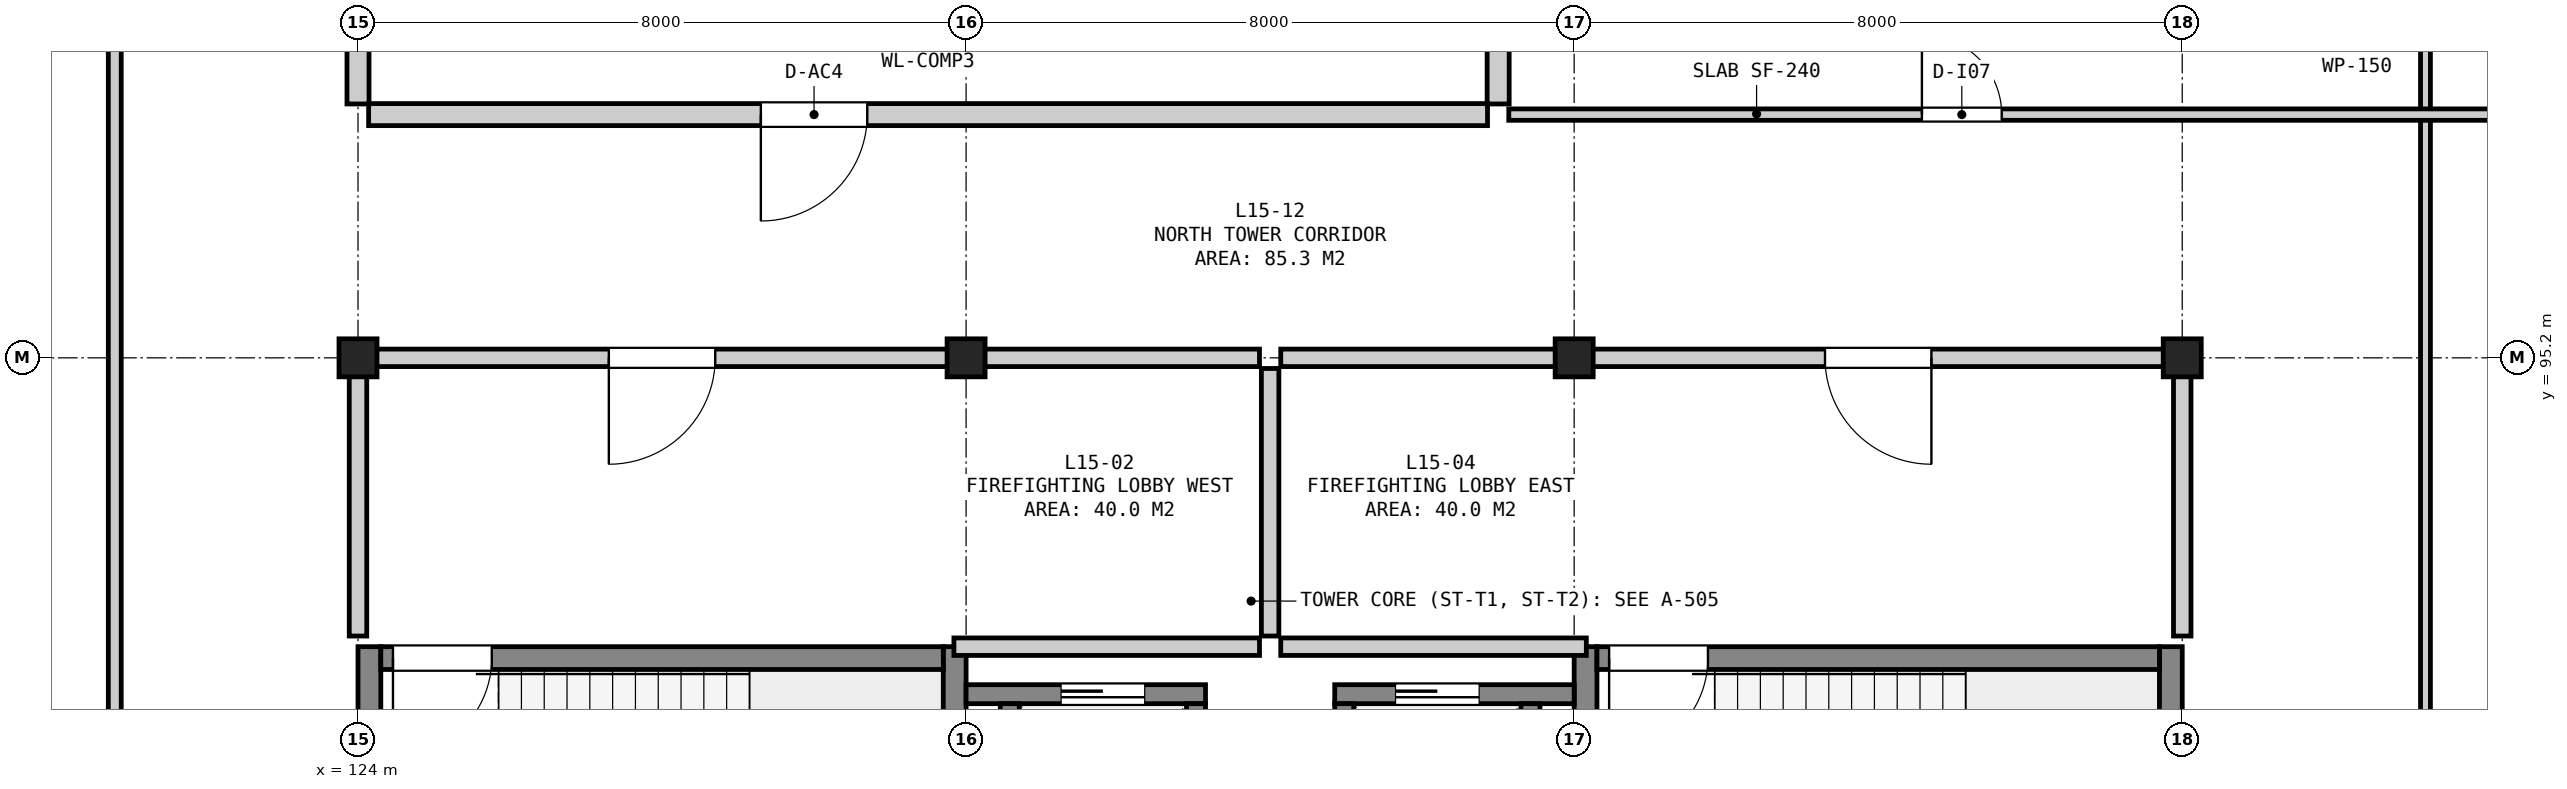
"""IFC4 building model, lengths in metres.
Left out: names, types, materials, properties, quantities, classifications, styles, units other than length and angle.
Written with IfcOpenShell. Run it as: python <this file> out.ifc"""

import sys

from ifc_helpers import new_model, si_unit, direction, frame, frame_2d, origin, origin_2d, place, context, subcontext, project, spatial, rectangle, extrude, element, fill, save


model = new_model("IFC4")
c1 = context("Model", 3, precision=1e-05, world=origin(), true_north=direction((0.0, 1.0)))
c2 = subcontext(c1, "Body", "Model", "MODEL_VIEW")
j1 = project(units=[si_unit("LENGTHUNIT", "METRE"), si_unit("PLANEANGLEUNIT", "RADIAN")], contexts=[c1])
p1 = place(None, origin())
s1 = spatial("IfcSite", under=j1, at=p1, CompositionType="ELEMENT")
p2 = place(p1, origin())
s2 = spatial("IfcBuilding", under=s1, at=p2, CompositionType="ELEMENT")
p3 = place(p2, frame((0.0, 0.0, 62.65)))
s3 = spatial("IfcBuildingStorey", under=s2, at=p3, CompositionType="ELEMENT", Elevation=62.65)
for number, where, z_axis, x_axis in (
    (1, (124.0, 95.2, 0.0), (0.0, 0.0, 1.0), (1.0, 0.0, 0.0)),
    (2, (132.0, 95.2, 0.0), (0.0, 0.0, 1.0), (1.0, 0.0, 0.0)),
    (3, (140.0, 95.2, 0.0), (0.0, 0.0, 1.0), (1.0, 0.0, 0.0)),
    (4, (148.0, 95.2, 0.0), (0.0, 0.0, 1.0), (1.0, 0.0, 0.0)),
):
    element("IfcColumn", number, at=place(p3, frame(where, z_axis=z_axis, x_axis=x_axis)), inside=s3, PredefinedType="COLUMN", context=c2, shape_type="SweptSolid", body=[
        extrude(rectangle(XDim=0.5, YDim=0.5, at=origin_2d()), origin(), (0.0, 0.0, 1.0), 3.95),
    ])
for number, where, z_axis, x_axis in (
    (5, (124.15, 87.2, 0.0), (0.0, 0.0, 1.0), (0.0, 1.0, 0.0)),
    (6, (131.85, 87.2, 0.0), (0.0, 0.0, 1.0), (0.0, 1.0, 0.0)),
):
    element("IfcWall", number, at=place(p3, frame(where, z_axis=z_axis, x_axis=x_axis)), inside=s3, PredefinedType="SHEAR", context=c2, shape_type="SweptSolid", body=[
        extrude(rectangle(XDim=4.2, YDim=0.3, at=frame_2d((2.1, 0.0))), origin(), (0.0, 0.0, 1.0), 3.67),
    ])
p4 = place(p3, frame((124.3, 91.25, 0.0), z_axis=(0.0, 0.0, 1.0), x_axis=(1.0, 0.0, 0.0)))
e7 = element("IfcWall", 7, at=p4, inside=s3, PredefinedType="SHEAR", context=c2, shape_type="SweptSolid", body=[
    extrude(rectangle(XDim=7.4, YDim=0.3, at=frame_2d((3.7, 0.0))), origin(), (0.0, 0.0, 1.0), 3.67),
])
p5 = place(p4, frame((0.16, 0.0, 0.0)))
e8 = element("IfcOpeningElement", 8, at=p5, cuts=e7, PredefinedType="OPENING", context=c2, shape_type="SweptSolid", body=[
    extrude(rectangle(XDim=1.3, YDim=2.18, at=frame_2d((0.65, 1.09))), frame((0.0, 0.162, 0.0), z_axis=(0.0, -1.0, 0.0), x_axis=(1.0, 0.0, 0.0)), (0.0, 0.0, 1.0), 0.324),
])
for number, where, z_axis, x_axis in (
    (9, (140.15, 87.2, 0.0), (0.0, 0.0, 1.0), (0.0, 1.0, 0.0)),
    (10, (147.85, 87.2, 0.0), (0.0, 0.0, 1.0), (0.0, 1.0, 0.0)),
):
    element("IfcWall", number, at=place(p3, frame(where, z_axis=z_axis, x_axis=x_axis)), inside=s3, PredefinedType="SHEAR", context=c2, shape_type="SweptSolid", body=[
        extrude(rectangle(XDim=4.2, YDim=0.3, at=frame_2d((2.1, 0.0))), origin(), (0.0, 0.0, 1.0), 3.67),
    ])
p6 = place(p3, frame((140.3, 91.25, 0.0), z_axis=(0.0, 0.0, 1.0), x_axis=(1.0, 0.0, 0.0)))
e11 = element("IfcWall", 11, at=p6, inside=s3, PredefinedType="SHEAR", context=c2, shape_type="SweptSolid", body=[
    extrude(rectangle(XDim=7.4, YDim=0.3, at=frame_2d((3.7, 0.0))), origin(), (0.0, 0.0, 1.0), 3.67),
])
p7 = place(p6, frame((0.16, 0.0, 0.0)))
e12 = element("IfcOpeningElement", 12, at=p7, cuts=e11, PredefinedType="OPENING", context=c2, shape_type="SweptSolid", body=[
    extrude(rectangle(XDim=1.3, YDim=2.18, at=frame_2d((0.65, 1.09))), frame((0.0, 0.162, 0.0), z_axis=(0.0, -1.0, 0.0), x_axis=(1.0, 0.0, 0.0)), (0.0, 0.0, 1.0), 0.324),
])
p8 = place(p3, frame((132.0, 90.775, 0.0), z_axis=(0.0, 0.0, 1.0), x_axis=(1.0, 0.0, 0.0)))
e13 = element("IfcWall", 13, at=p8, inside=s3, PredefinedType="SHEAR", context=c2, shape_type="SweptSolid", body=[
    extrude(rectangle(XDim=3.15, YDim=0.25, at=frame_2d((1.575, 0.0))), origin(), (0.0, 0.0, 1.0), 3.67),
])
p9 = place(p8, frame((1.25, 0.0, 0.0)))
e14 = element("IfcOpeningElement", 14, at=p9, cuts=e13, PredefinedType="OPENING", context=c2, shape_type="SweptSolid", body=[
    extrude(rectangle(XDim=1.1, YDim=2.15, at=frame_2d((0.55, 1.075))), frame((0.0, 0.137, 0.0), z_axis=(0.0, -1.0, 0.0), x_axis=(1.0, 0.0, 0.0)), (0.0, 0.0, 1.0), 0.274),
])
for number, where, z_axis, x_axis in (
    (15, (132.575, 87.75, 0.0), (0.0, 0.0, 1.0), (0.0, 1.0, 0.0)),
    (16, (135.025, 87.75, 0.0), (0.0, 0.0, 1.0), (0.0, 1.0, 0.0)),
):
    element("IfcWall", number, at=place(p3, frame(where, z_axis=z_axis, x_axis=x_axis)), inside=s3, PredefinedType="SHEAR", context=c2, shape_type="SweptSolid", body=[
        extrude(rectangle(XDim=2.9, YDim=0.25, at=frame_2d((1.45, 0.0))), origin(), (0.0, 0.0, 1.0), 3.67),
    ])
p10 = place(p3, frame((136.85, 90.775, 0.0), z_axis=(0.0, 0.0, 1.0), x_axis=(1.0, 0.0, 0.0)))
e17 = element("IfcWall", 17, at=p10, inside=s3, PredefinedType="SHEAR", context=c2, shape_type="SweptSolid", body=[
    extrude(rectangle(XDim=3.15, YDim=0.25, at=frame_2d((1.575, 0.0))), origin(), (0.0, 0.0, 1.0), 3.67),
])
p11 = place(p10, frame((0.8, 0.0, 0.0)))
e18 = element("IfcOpeningElement", 18, at=p11, cuts=e17, PredefinedType="OPENING", context=c2, shape_type="SweptSolid", body=[
    extrude(rectangle(XDim=1.1, YDim=2.15, at=frame_2d((0.55, 1.075))), frame((0.0, 0.137, 0.0), z_axis=(0.0, -1.0, 0.0), x_axis=(1.0, 0.0, 0.0)), (0.0, 0.0, 1.0), 0.274),
])
for number, where, z_axis, x_axis in (
    (19, (136.975, 87.75, 0.0), (0.0, 0.0, 1.0), (0.0, 1.0, 0.0)),
    (20, (139.425, 87.75, 0.0), (0.0, 0.0, 1.0), (0.0, 1.0, 0.0)),
):
    element("IfcWall", number, at=place(p3, frame(where, z_axis=z_axis, x_axis=x_axis)), inside=s3, PredefinedType="SHEAR", context=c2, shape_type="SweptSolid", body=[
        extrude(rectangle(XDim=2.9, YDim=0.25, at=frame_2d((1.45, 0.0))), origin(), (0.0, 0.0, 1.0), 3.67),
    ])
p12 = place(p3, frame((131.84, 91.4, 0.0), z_axis=(0.0, 0.0, 1.0), x_axis=(1.0, 0.0, 0.0)))
e21 = element("IfcWall", 21, at=p12, inside=s3, PredefinedType="SOLIDWALL", context=c2, shape_type="SweptSolid", body=[
    extrude(rectangle(XDim=4.02, YDim=0.23, at=frame_2d((2.01, 0.0))), origin(), (0.0, 0.0, 1.0), 3.67),
])
p13 = place(p3, frame((124.14, 95.2, 0.0), z_axis=(0.0, 0.0, 1.0), x_axis=(1.0, 0.0, 0.0)))
e22 = element("IfcWall", 22, at=p13, inside=s3, PredefinedType="SOLIDWALL", context=c2, shape_type="SweptSolid", body=[
    extrude(rectangle(XDim=11.72, YDim=0.23, at=frame_2d((5.86, 0.0))), origin(), (0.0, 0.0, 1.0), 3.045),
])
p14 = place(p13, frame((3.16, 0.0, 0.0)))
e23 = element("IfcOpeningElement", 23, at=p14, cuts=e22, PredefinedType="OPENING", context=c2, shape_type="SweptSolid", body=[
    extrude(rectangle(XDim=1.4, YDim=2.2, at=frame_2d((0.7, 1.1))), frame((0.0, 0.127, 0.0), z_axis=(0.0, -1.0, 0.0), x_axis=(1.0, 0.0, 0.0)), (0.0, 0.0, 1.0), 0.254),
])
p15 = place(p3, frame((124.0, 91.54, 0.0), z_axis=(0.0, 0.0, 1.0), x_axis=(0.0, 1.0, 0.0)))
e24 = element("IfcWall", 24, at=p15, inside=s3, PredefinedType="SOLIDWALL", context=c2, shape_type="SweptSolid", body=[
    extrude(rectangle(XDim=3.52, YDim=0.23, at=frame_2d((1.76, 0.0))), origin(), (0.0, 0.0, 1.0), 2.795),
])
p16 = place(p3, frame((136.0, 91.54, 0.0), z_axis=(0.0, 0.0, 1.0), x_axis=(0.0, 1.0, 0.0)))
e25 = element("IfcWall", 25, at=p16, inside=s3, PredefinedType="SOLIDWALL", context=c2, shape_type="SweptSolid", body=[
    extrude(rectangle(XDim=3.52, YDim=0.23, at=frame_2d((1.76, 0.0))), origin(), (0.0, 0.0, 1.0), 3.67),
])
p17 = place(p3, frame((136.14, 91.4, 0.0), z_axis=(0.0, 0.0, 1.0), x_axis=(1.0, 0.0, 0.0)))
e26 = element("IfcWall", 26, at=p17, inside=s3, PredefinedType="SOLIDWALL", context=c2, shape_type="SweptSolid", body=[
    extrude(rectangle(XDim=4.02, YDim=0.23, at=frame_2d((2.01, 0.0))), origin(), (0.0, 0.0, 1.0), 3.67),
])
p18 = place(p3, frame((136.14, 95.2, 0.0), z_axis=(0.0, 0.0, 1.0), x_axis=(1.0, 0.0, 0.0)))
e27 = element("IfcWall", 27, at=p18, inside=s3, PredefinedType="SOLIDWALL", context=c2, shape_type="SweptSolid", body=[
    extrude(rectangle(XDim=11.72, YDim=0.23, at=frame_2d((5.86, 0.0))), origin(), (0.0, 0.0, 1.0), 3.045),
])
p19 = place(p18, frame((7.16, 0.0, 0.0)))
e28 = element("IfcOpeningElement", 28, at=p19, cuts=e27, PredefinedType="OPENING", context=c2, shape_type="SweptSolid", body=[
    extrude(rectangle(XDim=1.4, YDim=2.2, at=frame_2d((0.7, 1.1))), frame((0.0, 0.127, 0.0), z_axis=(0.0, -1.0, 0.0), x_axis=(1.0, 0.0, 0.0)), (0.0, 0.0, 1.0), 0.254),
])
p20 = place(p3, frame((148.0, 91.54, 0.0), z_axis=(0.0, 0.0, 1.0), x_axis=(0.0, 1.0, 0.0)))
e29 = element("IfcWall", 29, at=p20, inside=s3, PredefinedType="SOLIDWALL", context=c2, shape_type="SweptSolid", body=[
    extrude(rectangle(XDim=3.52, YDim=0.23, at=frame_2d((1.76, 0.0))), origin(), (0.0, 0.0, 1.0), 2.995),
])
p21 = place(p3, frame((151.2, 76.0, 0.0), z_axis=(0.0, 0.0, 1.0), x_axis=(0.0, 1.0, 0.0)))
e30 = element("IfcWall", 30, at=p21, inside=s3, PredefinedType="PARTITIONING", context=c2, shape_type="SweptSolid", body=[
    extrude(rectangle(XDim=32.66, YDim=0.13, at=frame_2d((16.33, 0.0))), origin(), (0.0, 0.0, 1.0), 3.67),
])
p22 = place(p21, frame((6.675, 0.0, 0.0)))
e31 = element("IfcOpeningElement", 31, at=p22, cuts=e30, PredefinedType="OPENING", context=c2, shape_type="SweptSolid", body=[
    extrude(rectangle(XDim=1.05, YDim=2.15, at=frame_2d((0.525, 1.075))), frame((0.0, 0.077, 0.0), z_axis=(0.0, -1.0, 0.0), x_axis=(1.0, 0.0, 0.0)), (0.0, 0.0, 1.0), 0.154),
])
p23 = place(p3, frame((120.8, 76.14, 0.0), z_axis=(0.0, 0.0, 1.0), x_axis=(0.0, 1.0, 0.0)))
e32 = element("IfcWall", 32, at=p23, inside=s3, PredefinedType="PARTITIONING", context=c2, shape_type="SweptSolid", body=[
    extrude(rectangle(XDim=32.555, YDim=0.17, at=frame_2d((16.278, 0.0))), origin(), (0.0, 0.0, 1.0), 3.67),
])
p24 = place(p23, frame((6.535, 0.0, 0.0)))
e33 = element("IfcOpeningElement", 33, at=p24, cuts=e32, PredefinedType="OPENING", context=c2, shape_type="SweptSolid", body=[
    extrude(rectangle(XDim=1.05, YDim=2.15, at=frame_2d((0.525, 1.075))), frame((0.0, 0.097, 0.0), z_axis=(0.0, -1.0, 0.0), x_axis=(1.0, 0.0, 0.0)), (0.0, 0.0, 1.0), 0.194),
])
p25 = place(p3, frame((124.14, 98.4, 0.0), z_axis=(0.0, 0.0, 1.0), x_axis=(1.0, 0.0, 0.0)))
e34 = element("IfcWall", 34, at=p25, inside=s3, PredefinedType="SOLIDWALL", context=c2, shape_type="SweptSolid", body=[
    extrude(rectangle(XDim=14.72, YDim=0.29, at=frame_2d((7.36, 0.0))), origin(), (0.0, 0.0, 1.0), 3.67),
])
p26 = place(p25, frame((5.16, 0.0, 0.0)))
e35 = element("IfcOpeningElement", 35, at=p26, cuts=e34, PredefinedType="OPENING", context=c2, shape_type="SweptSolid", body=[
    extrude(rectangle(XDim=1.4, YDim=2.2, at=frame_2d((0.7, 1.1))), frame((0.0, 0.157, 0.0), z_axis=(0.0, -1.0, 0.0), x_axis=(1.0, 0.0, 0.0)), (0.0, 0.0, 1.0), 0.314),
])
p27 = place(p3, frame((124.0, 98.54, 0.0), z_axis=(0.0, 0.0, 1.0), x_axis=(0.0, 1.0, 0.0)))
e36 = element("IfcWall", 36, at=p27, inside=s3, PredefinedType="SOLIDWALL", context=c2, shape_type="SweptSolid", body=[
    extrude(rectangle(XDim=10.42, YDim=0.29, at=frame_2d((5.21, 0.0))), origin(), (0.0, 0.0, 1.0), 2.595),
])
p28 = place(p3, frame((139.0, 98.54, 0.0), z_axis=(0.0, 0.0, 1.0), x_axis=(0.0, 1.0, 0.0)))
e37 = element("IfcWall", 37, at=p28, inside=s3, PredefinedType="SOLIDWALL", context=c2, shape_type="SweptSolid", body=[
    extrude(rectangle(XDim=16.485, YDim=0.29, at=frame_2d((8.242, 0.0))), origin(), (0.0, 0.0, 1.0), 3.67),
])
p29 = place(p3, frame((139.14, 98.4, 0.0), z_axis=(0.0, 0.0, 1.0), x_axis=(1.0, 0.0, 0.0)))
e38 = element("IfcWall", 38, at=p29, inside=s3, PredefinedType="PARTITIONING", context=c2, shape_type="SweptSolid", body=[
    extrude(rectangle(XDim=22.32, YDim=0.15, at=frame_2d((11.16, 0.0))), origin(), (0.0, 0.0, 1.0), 3.67),
])
p30 = place(p29, frame((5.435, 0.0, 0.0)))
e39 = element("IfcOpeningElement", 39, at=p30, cuts=e38, PredefinedType="OPENING", context=c2, shape_type="SweptSolid", body=[
    extrude(rectangle(XDim=1.05, YDim=2.15, at=frame_2d((0.525, 1.075))), frame((0.0, 0.087, 0.0), z_axis=(0.0, -1.0, 0.0), x_axis=(1.0, 0.0, 0.0)), (0.0, 0.0, 1.0), 0.174),
])
p31 = place(p5, frame((1.3, 0.0, 0.0), z_axis=(0.0, 0.0, 1.0), x_axis=(-1.0, 0.0, 0.0)))
e40 = element("IfcDoor", 40, at=p31, inside=s3, OperationType="SINGLE_SWING_RIGHT", PredefinedType="DOOR", context=c2, shape_type="SweptSolid", body=[
    extrude(rectangle(XDim=1.3, YDim=2.18, at=frame_2d((0.65, 1.09))), frame((0.0, 0.025, 0.0), z_axis=(0.0, -1.0, 0.0), x_axis=(1.0, 0.0, 0.0)), (0.0, 0.0, 1.0), 0.05),
])
fill(e8, e40)
p32 = place(p7, frame((1.3, 0.0, 0.0), z_axis=(0.0, 0.0, 1.0), x_axis=(-1.0, 0.0, 0.0)))
e41 = element("IfcDoor", 41, at=p32, inside=s3, OperationType="SINGLE_SWING_RIGHT", PredefinedType="DOOR", context=c2, shape_type="SweptSolid", body=[
    extrude(rectangle(XDim=1.3, YDim=2.18, at=frame_2d((0.65, 1.09))), frame((0.0, 0.025, 0.0), z_axis=(0.0, -1.0, 0.0), x_axis=(1.0, 0.0, 0.0)), (0.0, 0.0, 1.0), 0.05),
])
fill(e12, e41)
p33 = place(p9, origin())
e42 = element("IfcDoor", 42, at=p33, inside=s3, OperationType="SLIDING_TO_LEFT", PredefinedType="DOOR", context=c2, shape_type="SweptSolid", body=[
    extrude(rectangle(XDim=1.1, YDim=2.15, at=frame_2d((0.55, 1.075))), frame((0.0, 0.025, 0.0), z_axis=(0.0, -1.0, 0.0), x_axis=(1.0, 0.0, 0.0)), (0.0, 0.0, 1.0), 0.05),
])
fill(e14, e42)
p34 = place(p11, origin())
e43 = element("IfcDoor", 43, at=p34, inside=s3, OperationType="SLIDING_TO_LEFT", PredefinedType="DOOR", context=c2, shape_type="SweptSolid", body=[
    extrude(rectangle(XDim=1.1, YDim=2.15, at=frame_2d((0.55, 1.075))), frame((0.0, 0.025, 0.0), z_axis=(0.0, -1.0, 0.0), x_axis=(1.0, 0.0, 0.0)), (0.0, 0.0, 1.0), 0.05),
])
fill(e18, e43)
p35 = place(p14, frame((1.4, 0.0, 0.0), z_axis=(0.0, 0.0, 1.0), x_axis=(-1.0, 0.0, 0.0)))
e44 = element("IfcDoor", 44, at=p35, inside=s3, OperationType="SINGLE_SWING_RIGHT", PredefinedType="DOOR", context=c2, shape_type="SweptSolid", body=[
    extrude(rectangle(XDim=1.4, YDim=2.2, at=frame_2d((0.7, 1.1))), frame((0.0, 0.025, 0.0), z_axis=(0.0, -1.0, 0.0), x_axis=(1.0, 0.0, 0.0)), (0.0, 0.0, 1.0), 0.05),
])
fill(e23, e44)
p36 = place(p19, frame((1.4, 0.0, 0.0), z_axis=(0.0, 0.0, 1.0), x_axis=(-1.0, 0.0, 0.0)))
e45 = element("IfcDoor", 45, at=p36, inside=s3, OperationType="SINGLE_SWING_LEFT", PredefinedType="DOOR", context=c2, shape_type="SweptSolid", body=[
    extrude(rectangle(XDim=1.4, YDim=2.2, at=frame_2d((0.7, 1.1))), frame((0.0, 0.025, 0.0), z_axis=(0.0, -1.0, 0.0), x_axis=(1.0, 0.0, 0.0)), (0.0, 0.0, 1.0), 0.05),
])
fill(e28, e45)
p37 = place(p26, frame((1.4, 0.0, 0.0), z_axis=(0.0, 0.0, 1.0), x_axis=(-1.0, 0.0, 0.0)))
e46 = element("IfcDoor", 46, at=p37, inside=s3, OperationType="SINGLE_SWING_RIGHT", PredefinedType="DOOR", context=c2, shape_type="SweptSolid", body=[
    extrude(rectangle(XDim=1.4, YDim=2.2, at=frame_2d((0.7, 1.1))), frame((0.0, 0.025, 0.0), z_axis=(0.0, -1.0, 0.0), x_axis=(1.0, 0.0, 0.0)), (0.0, 0.0, 1.0), 0.05),
])
fill(e35, e46)
p38 = place(p30, origin())
e47 = element("IfcDoor", 47, at=p38, inside=s3, OperationType="SINGLE_SWING_LEFT", PredefinedType="DOOR", context=c2, shape_type="SweptSolid", body=[
    extrude(rectangle(XDim=1.05, YDim=2.15, at=frame_2d((0.525, 1.075))), frame((0.0, 0.025, 0.0), z_axis=(0.0, -1.0, 0.0), x_axis=(1.0, 0.0, 0.0)), (0.0, 0.0, 1.0), 0.05),
])
fill(e39, e47)
save(model, sys.argv[1])
